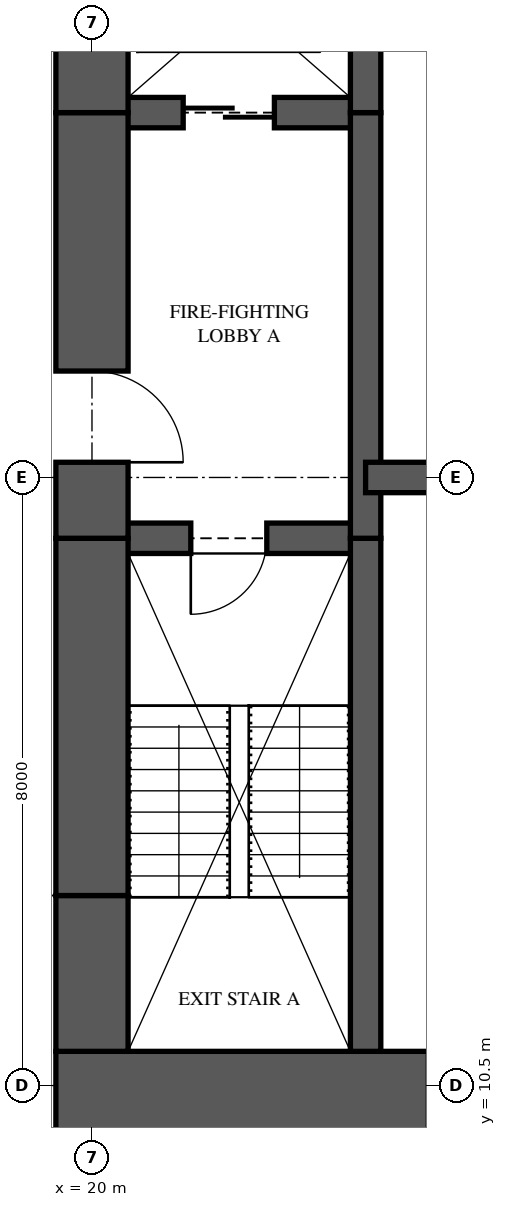
"""IFC4 building model, lengths in metres.
Left out: names, types, materials, properties, quantities, classifications, styles, units other than length and angle.
Written with IfcOpenShell. Run it as: python <this file> out.ifc"""

import sys

from ifc_helpers import new_model, si_unit, direction, frame, frame_2d, origin, place, context, subcontext, project, spatial, rectangle, extrude, element, fill, save


model = new_model("IFC4")
c1 = context("Model", 3, precision=1e-05, world=origin(), true_north=direction((0.0, 1.0)))
c2 = subcontext(c1, "Body", "Model", "MODEL_VIEW")
j1 = project(units=[si_unit("LENGTHUNIT", "METRE"), si_unit("PLANEANGLEUNIT", "RADIAN")], contexts=[c1])
p1 = place(None, origin())
s1 = spatial("IfcSite", under=j1, at=p1, CompositionType="ELEMENT")
p2 = place(p1, origin())
s2 = spatial("IfcBuilding", under=s1, at=p2, CompositionType="ELEMENT")
p3 = place(p2, frame((0.0, 0.0, 34.4)))
s3 = spatial("IfcBuildingStorey", under=s2, at=p3, CompositionType="ELEMENT", Elevation=34.4)
p4 = place(p3, frame((19.525, 10.125, 0.0), z_axis=(0.0, 0.0, 1.0), x_axis=(1.0, 0.0, 0.0)))
e1 = element("IfcWall", 1, at=p4, inside=s3, PredefinedType="SHEAR", context=c2, shape_type="SweptSolid", body=[
    extrude(rectangle(XDim=6.475, YDim=1.65, at=frame_2d((3.238, 0.0))), origin(), (0.0, 0.0, 1.0), 3.35),
])
p5 = place(p4, frame((4.9, 0.0, 0.0)))
e2 = element("IfcOpeningElement", 2, at=p5, cuts=e1, PredefinedType="OPENING", context=c2, shape_type="SweptSolid", body=[
    extrude(rectangle(XDim=0.75, YDim=2.1, at=frame_2d((0.375, 1.05))), frame((0.0, 0.835, 0.0), z_axis=(0.0, -1.0, 0.0), x_axis=(1.0, 0.0, 0.0)), (0.0, 0.0, 1.0), 1.67),
])
p6 = place(p3, frame((20.0, 26.05, 0.0), z_axis=(0.0, 0.0, 1.0), x_axis=(0.0, -1.0, 0.0)))
e3 = element("IfcWall", 3, at=p6, inside=s3, PredefinedType="SHEAR", context=c2, shape_type="SweptSolid", body=[
    extrude(rectangle(XDim=2.75, YDim=0.95, at=frame_2d((1.375, 0.0))), origin(), (0.0, 0.0, 1.0), 3.35),
])
p7 = place(p3, frame((20.0, 23.3, 0.0), z_axis=(0.0, 0.0, 1.0), x_axis=(0.0, -1.0, 0.0)))
e4 = element("IfcWall", 4, at=p7, inside=s3, PredefinedType="SHEAR", context=c2, shape_type="SweptSolid", body=[
    extrude(rectangle(XDim=5.6, YDim=0.95, at=frame_2d((2.8, 0.0))), origin(), (0.0, 0.0, 1.0), 3.35),
])
p8 = place(p7, frame((3.4, 0.0, 0.0)))
e5 = element("IfcOpeningElement", 5, at=p8, cuts=e4, PredefinedType="OPENING", context=c2, shape_type="SweptSolid", body=[
    extrude(rectangle(XDim=1.2, YDim=2.2, at=frame_2d((0.6, 1.1))), frame((0.0, 0.485, 0.0), z_axis=(0.0, -1.0, 0.0), x_axis=(1.0, 0.0, 0.0)), (0.0, 0.0, 1.0), 0.97),
])
p9 = place(p3, frame((20.0, 17.7, 0.0), z_axis=(0.0, 0.0, 1.0), x_axis=(0.0, -1.0, 0.0)))
e6 = element("IfcWall", 6, at=p9, inside=s3, PredefinedType="SHEAR", context=c2, shape_type="SweptSolid", body=[
    extrude(rectangle(XDim=4.7, YDim=0.95, at=frame_2d((2.35, 0.0))), origin(), (0.0, 0.0, 1.0), 3.35),
])
p10 = place(p3, frame((20.0, 13.0, 0.0), z_axis=(0.0, 0.0, 1.0), x_axis=(0.0, -1.0, 0.0)))
e7 = element("IfcWall", 7, at=p10, inside=s3, PredefinedType="SHEAR", context=c2, shape_type="SweptSolid", body=[
    extrude(rectangle(XDim=2.05, YDim=0.95, at=frame_2d((1.025, 0.0))), origin(), (0.0, 0.0, 1.0), 3.35),
])
p11 = place(p3, frame((23.6, 10.95, 0.0), z_axis=(0.0, 0.0, 1.0), x_axis=(0.0, 1.0, 0.0)))
e8 = element("IfcWall", 8, at=p11, inside=s3, PredefinedType="SHEAR", context=c2, shape_type="SweptSolid", body=[
    extrude(rectangle(XDim=6.75, YDim=0.4, at=frame_2d((3.375, 0.0))), origin(), (0.0, 0.0, 1.0), 3.35),
])
p12 = place(p3, frame((23.6, 17.7, 0.0), z_axis=(0.0, 0.0, 1.0), x_axis=(0.0, 1.0, 0.0)))
e9 = element("IfcWall", 9, at=p12, inside=s3, PredefinedType="SHEAR", context=c2, shape_type="SweptSolid", body=[
    extrude(rectangle(XDim=5.6, YDim=0.4, at=frame_2d((2.8, 0.0))), origin(), (0.0, 0.0, 1.0), 3.35),
])
p13 = place(p3, frame((23.6, 23.3, 0.0), z_axis=(0.0, 0.0, 1.0), x_axis=(0.0, 1.0, 0.0)))
e10 = element("IfcWall", 10, at=p13, inside=s3, PredefinedType="SHEAR", context=c2, shape_type="SweptSolid", body=[
    extrude(rectangle(XDim=2.75, YDim=0.4, at=frame_2d((1.375, 0.0))), origin(), (0.0, 0.0, 1.0), 3.35),
])
p14 = place(p3, frame((20.0, 17.7, 0.0), z_axis=(0.0, 0.0, 1.0), x_axis=(1.0, 0.0, 0.0)))
e11 = element("IfcWall", 11, at=p14, inside=s3, PredefinedType="SHEAR", context=c2, shape_type="SweptSolid", body=[
    extrude(rectangle(XDim=3.6, YDim=0.4, at=frame_2d((1.8, 0.0))), origin(), (0.0, 0.0, 1.0), 3.35),
])
p15 = place(p14, frame((1.3, 0.0, 0.0)))
e12 = element("IfcOpeningElement", 12, at=p15, cuts=e11, PredefinedType="OPENING", context=c2, shape_type="SweptSolid", body=[
    extrude(rectangle(XDim=1.0, YDim=2.1, at=frame_2d((0.5, 1.05))), frame((0.0, 0.21, 0.0), z_axis=(0.0, -1.0, 0.0), x_axis=(1.0, 0.0, 0.0)), (0.0, 0.0, 1.0), 0.42),
])
p16 = place(p3, frame((20.0, 23.3, 0.0), z_axis=(0.0, 0.0, 1.0), x_axis=(1.0, 0.0, 0.0)))
e13 = element("IfcWall", 13, at=p16, inside=s3, PredefinedType="SHEAR", context=c2, shape_type="SweptSolid", body=[
    extrude(rectangle(XDim=3.6, YDim=0.4, at=frame_2d((1.8, 0.0))), origin(), (0.0, 0.0, 1.0), 3.35),
])
p17 = place(p16, frame((1.2, 0.0, 0.0)))
e14 = element("IfcOpeningElement", 14, at=p17, cuts=e13, PredefinedType="OPENING", context=c2, shape_type="SweptSolid", body=[
    extrude(rectangle(XDim=1.2, YDim=2.1, at=frame_2d((0.6, 1.05))), frame((0.0, 0.21, 0.0), z_axis=(0.0, -1.0, 0.0), x_axis=(1.0, 0.0, 0.0)), (0.0, 0.0, 1.0), 0.42),
])
p18 = place(p3, frame((23.6, 18.5, 0.0), z_axis=(0.0, 0.0, 1.0), x_axis=(1.0, 0.0, 0.0)))
e15 = element("IfcWall", 15, at=p18, inside=s3, PredefinedType="SHEAR", context=c2, shape_type="SweptSolid", body=[
    extrude(rectangle(XDim=2.4, YDim=0.4, at=frame_2d((1.2, 0.0))), origin(), (0.0, 0.0, 1.0), 3.35),
])
p19 = place(p15, frame((1.0, 0.0, 0.0), z_axis=(0.0, 0.0, 1.0), x_axis=(-1.0, 0.0, 0.0)))
e16 = element("IfcDoor", 16, at=p19, inside=s3, OperationType="SINGLE_SWING_RIGHT", PredefinedType="DOOR", context=c2, shape_type="SweptSolid", body=[
    extrude(rectangle(XDim=1.0, YDim=2.1, at=frame_2d((0.5, 1.05))), frame((0.0, 0.025, 0.0), z_axis=(0.0, -1.0, 0.0), x_axis=(1.0, 0.0, 0.0)), (0.0, 0.0, 1.0), 0.05),
])
fill(e12, e16)
p20 = place(p8, origin())
e17 = element("IfcDoor", 17, at=p20, inside=s3, OperationType="SINGLE_SWING_RIGHT", PredefinedType="DOOR", context=c2, shape_type="SweptSolid", body=[
    extrude(rectangle(XDim=1.2, YDim=2.2, at=frame_2d((0.6, 1.1))), frame((0.0, 0.025, 0.0), z_axis=(0.0, -1.0, 0.0), x_axis=(1.0, 0.0, 0.0)), (0.0, 0.0, 1.0), 0.05),
])
fill(e5, e17)
p21 = place(p17, origin())
e18 = element("IfcDoor", 18, at=p21, inside=s3, OperationType="SLIDING_TO_LEFT", PredefinedType="DOOR", context=c2, shape_type="SweptSolid", body=[
    extrude(rectangle(XDim=1.2, YDim=2.1, at=frame_2d((0.6, 1.05))), frame((0.0, 0.025, 0.0), z_axis=(0.0, -1.0, 0.0), x_axis=(1.0, 0.0, 0.0)), (0.0, 0.0, 1.0), 0.05),
])
fill(e14, e18)
save(model, sys.argv[1])
